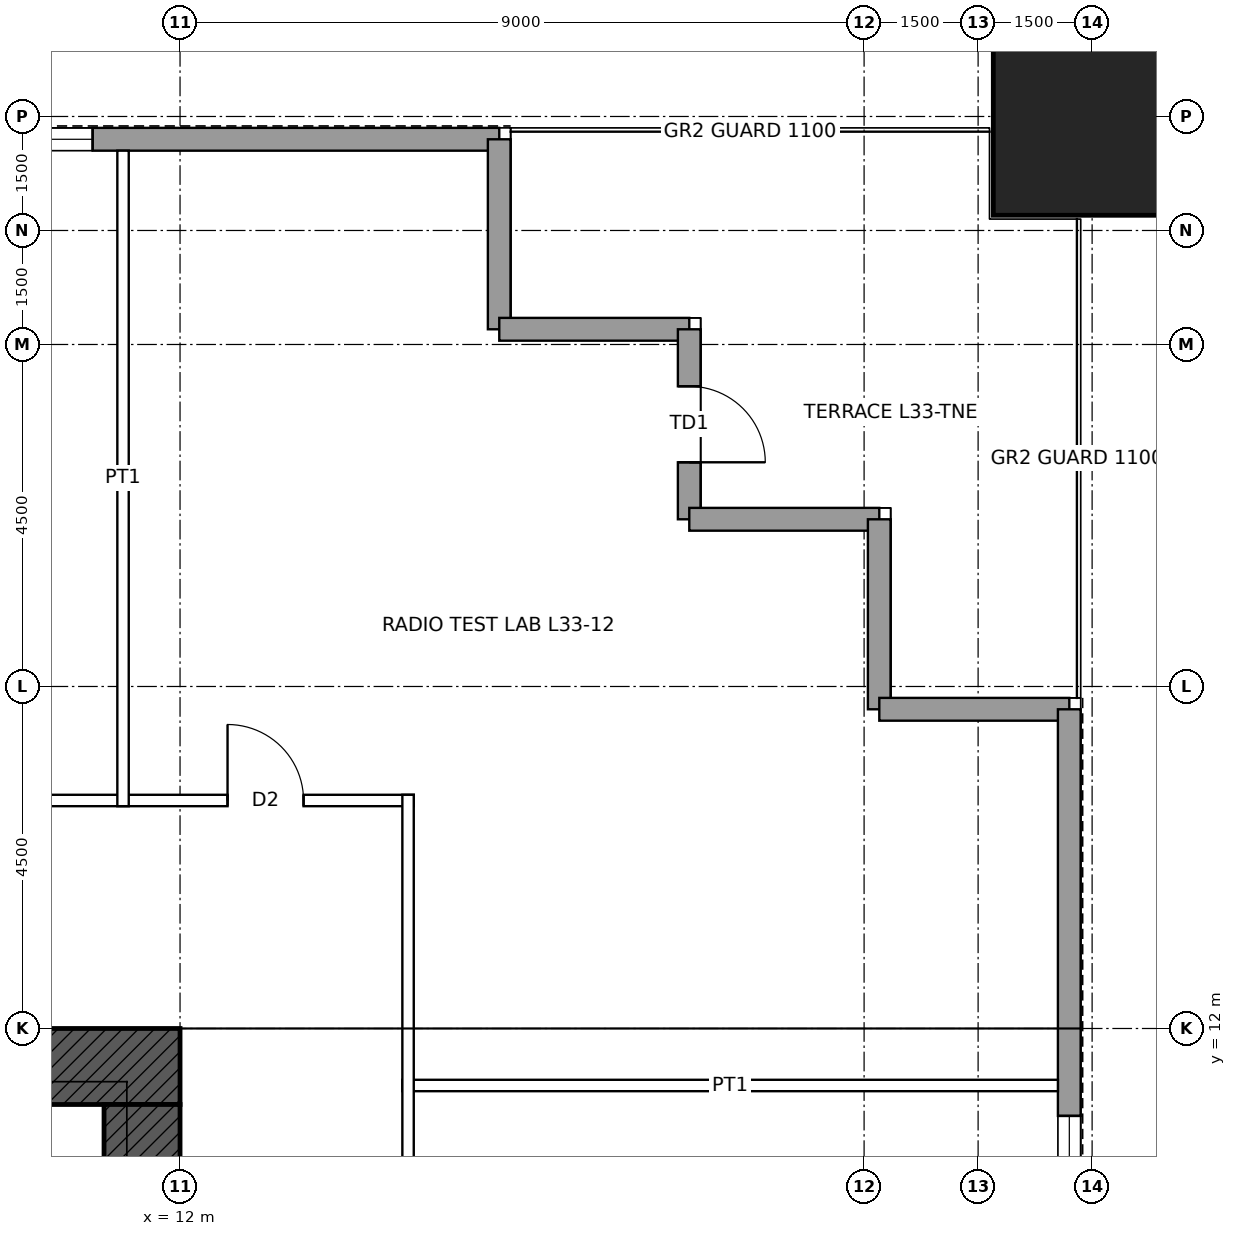
"""IFC4 building model, lengths in metres.
Left out: names, types, materials, properties, quantities, classifications, styles, units other than length and angle.
Written with IfcOpenShell. Run it as: python <this file> out.ifc"""

import sys

from ifc_helpers import new_model, si_unit, direction, frame, frame_2d, origin, origin_2d, place, context, subcontext, project, spatial, rectangle, hollow_rectangle, extrude, element, fill, save


model = new_model("IFC4")
c1 = context("Model", 3, precision=1e-05, world=origin(), true_north=direction((0.0, 1.0)))
c2 = subcontext(c1, "Body", "Model", "MODEL_VIEW")
j1 = project(units=[si_unit("LENGTHUNIT", "METRE"), si_unit("PLANEANGLEUNIT", "RADIAN")], contexts=[c1])
p1 = place(None, origin())
s1 = spatial("IfcSite", under=j1, at=p1, CompositionType="ELEMENT")
p2 = place(p1, origin())
s2 = spatial("IfcBuilding", under=s1, at=p2, CompositionType="ELEMENT")
p3 = place(p2, frame((0.0, 0.0, 162.9)))
s3 = spatial("IfcBuildingStorey", under=s2, at=p3, CompositionType="ELEMENT", Elevation=162.9)
p4 = place(p3, frame((24.0, 24.0, 0.0), z_axis=(0.0, 0.0, 1.0), x_axis=(1.0, 0.0, 0.0)))
e1 = element("IfcColumn", 1, at=p4, inside=s3, PredefinedType="COLUMN", context=c2, shape_type="SweptSolid", body=[
    extrude(hollow_rectangle(XDim=2.6, YDim=2.6, WallThickness=0.13, at=origin_2d()), origin(), (0.0, 0.0, 1.0), 4.5),
])
p5 = place(p3, frame((-12.0, 11.5, 0.0), z_axis=(0.0, 0.0, 1.0), x_axis=(1.0, 0.0, 0.0)))
e2 = element("IfcWall", 2, at=p5, inside=s3, PredefinedType="SHEAR", context=c2, shape_type="SweptSolid", body=[
    extrude(rectangle(XDim=24.0, YDim=1.0, at=frame_2d((12.0, 0.0))), origin(), (0.0, 0.0, 1.0), 4.5),
])
p6 = place(p5, frame((6.25, 0.0, 0.0)))
e3 = element("IfcOpeningElement", 3, at=p6, cuts=e2, PredefinedType="OPENING", context=c2, shape_type="SweptSolid", body=[
    extrude(rectangle(XDim=1.0, YDim=2.4, at=frame_2d((0.5, 1.2))), frame((0.0, 0.51, 0.0), z_axis=(0.0, -1.0, 0.0), x_axis=(1.0, 0.0, 0.0)), (0.0, 0.0, 1.0), 1.02),
])
p7 = place(p5, frame((16.75, 0.0, 0.0)))
e4 = element("IfcOpeningElement", 4, at=p7, cuts=e2, PredefinedType="OPENING", context=c2, shape_type="SweptSolid", body=[
    extrude(rectangle(XDim=1.0, YDim=2.4, at=frame_2d((0.5, 1.2))), frame((0.0, 0.51, 0.0), z_axis=(0.0, -1.0, 0.0), x_axis=(1.0, 0.0, 0.0)), (0.0, 0.0, 1.0), 1.02),
])
p8 = place(p3, frame((11.5, 11.0, 0.0), z_axis=(0.0, 0.0, 1.0), x_axis=(0.0, -1.0, 0.0)))
e5 = element("IfcWall", 5, at=p8, inside=s3, PredefinedType="SHEAR", context=c2, shape_type="SweptSolid", body=[
    extrude(rectangle(XDim=22.0, YDim=1.0, at=frame_2d((11.0, 0.0))), origin(), (0.0, 0.0, 1.0), 4.5),
])
p9 = place(p8, frame((10.5, 0.0, 0.0)))
e6 = element("IfcOpeningElement", 6, at=p9, cuts=e5, PredefinedType="OPENING", context=c2, shape_type="SweptSolid", body=[
    extrude(rectangle(XDim=1.0, YDim=2.4, at=frame_2d((0.5, 1.2))), frame((0.0, 0.51, 0.0), z_axis=(0.0, -1.0, 0.0), x_axis=(1.0, 0.0, 0.0)), (0.0, 0.0, 1.0), 1.02),
])
p10 = place(p3, frame((-16.2, 23.7, 0.0), z_axis=(0.0, 0.0, 1.0), x_axis=(1.0, 0.0, 0.0)))
e7 = element("IfcWall", 7, at=p10, inside=s3, PredefinedType="SOLIDWALL", context=c2, shape_type="SweptSolid", body=[
    extrude(rectangle(XDim=32.4, YDim=0.3, at=frame_2d((16.2, 0.0))), origin(), (0.0, 0.0, 1.0), 4.3),
])
p11 = place(p10, frame((5.35, 0.0, 1.0)))
e8 = element("IfcOpeningElement", 8, at=p11, cuts=e7, PredefinedType="OPENING", context=c2, shape_type="SweptSolid", body=[
    extrude(rectangle(XDim=1.8, YDim=1.2, at=frame_2d((0.9, 0.6))), frame((0.0, 0.16, 0.0), z_axis=(0.0, -1.0, 0.0), x_axis=(1.0, 0.0, 0.0)), (0.0, 0.0, 1.0), 0.32),
])
p12 = place(p10, frame((7.45, 0.0, 1.0)))
e9 = element("IfcOpeningElement", 9, at=p12, cuts=e7, PredefinedType="OPENING", context=c2, shape_type="SweptSolid", body=[
    extrude(rectangle(XDim=2.4, YDim=1.2, at=frame_2d((1.2, 0.6))), frame((0.0, 0.16, 0.0), z_axis=(0.0, -1.0, 0.0), x_axis=(1.0, 0.0, 0.0)), (0.0, 0.0, 1.0), 0.32),
])
p13 = place(p10, frame((10.15, 0.0, 1.0)))
e10 = element("IfcOpeningElement", 10, at=p13, cuts=e7, PredefinedType="OPENING", context=c2, shape_type="SweptSolid", body=[
    extrude(rectangle(XDim=2.4, YDim=1.2, at=frame_2d((1.2, 0.6))), frame((0.0, 0.16, 0.0), z_axis=(0.0, -1.0, 0.0), x_axis=(1.0, 0.0, 0.0)), (0.0, 0.0, 1.0), 0.32),
])
p14 = place(p10, frame((13.0, 0.0, 1.0)))
e11 = element("IfcOpeningElement", 11, at=p14, cuts=e7, PredefinedType="OPENING", context=c2, shape_type="SweptSolid", body=[
    extrude(rectangle(XDim=2.4, YDim=1.2, at=frame_2d((1.2, 0.6))), frame((0.0, 0.16, 0.0), z_axis=(0.0, -1.0, 0.0), x_axis=(1.0, 0.0, 0.0)), (0.0, 0.0, 1.0), 0.32),
])
p15 = place(p10, frame((17.0, 0.0, 1.0)))
e12 = element("IfcOpeningElement", 12, at=p15, cuts=e7, PredefinedType="OPENING", context=c2, shape_type="SweptSolid", body=[
    extrude(rectangle(XDim=2.4, YDim=1.2, at=frame_2d((1.2, 0.6))), frame((0.0, 0.16, 0.0), z_axis=(0.0, -1.0, 0.0), x_axis=(1.0, 0.0, 0.0)), (0.0, 0.0, 1.0), 0.32),
])
p16 = place(p10, frame((19.85, 0.0, 1.0)))
e13 = element("IfcOpeningElement", 13, at=p16, cuts=e7, PredefinedType="OPENING", context=c2, shape_type="SweptSolid", body=[
    extrude(rectangle(XDim=2.4, YDim=1.2, at=frame_2d((1.2, 0.6))), frame((0.0, 0.16, 0.0), z_axis=(0.0, -1.0, 0.0), x_axis=(1.0, 0.0, 0.0)), (0.0, 0.0, 1.0), 0.32),
])
p17 = place(p10, frame((22.55, 0.0, 1.0)))
e14 = element("IfcOpeningElement", 14, at=p17, cuts=e7, PredefinedType="OPENING", context=c2, shape_type="SweptSolid", body=[
    extrude(rectangle(XDim=2.4, YDim=1.2, at=frame_2d((1.2, 0.6))), frame((0.0, 0.16, 0.0), z_axis=(0.0, -1.0, 0.0), x_axis=(1.0, 0.0, 0.0)), (0.0, 0.0, 1.0), 0.32),
])
p18 = place(p10, frame((25.25, 0.0, 1.0)))
e15 = element("IfcOpeningElement", 15, at=p18, cuts=e7, PredefinedType="OPENING", context=c2, shape_type="SweptSolid", body=[
    extrude(rectangle(XDim=1.8, YDim=1.2, at=frame_2d((0.9, 0.6))), frame((0.0, 0.16, 0.0), z_axis=(0.0, -1.0, 0.0), x_axis=(1.0, 0.0, 0.0)), (0.0, 0.0, 1.0), 0.32),
])
for number, where, z_axis, x_axis in (
    (16, (16.2, 23.7, 0.0), (0.0, 0.0, 1.0), (0.0, -1.0, 0.0)),
    (17, (16.2, 21.2, 0.0), (0.0, 0.0, 1.0), (1.0, 0.0, 0.0)),
):
    element("IfcWall", number, at=place(p3, frame(where, z_axis=z_axis, x_axis=x_axis)), inside=s3, PredefinedType="SOLIDWALL", context=c2, shape_type="SweptSolid", body=[
        extrude(rectangle(XDim=2.5, YDim=0.3, at=frame_2d((1.25, 0.0))), origin(), (0.0, 0.0, 1.0), 4.3),
    ])
p19 = place(p3, frame((18.7, 21.2, 0.0), z_axis=(0.0, 0.0, 1.0), x_axis=(0.0, -1.0, 0.0)))
e18 = element("IfcWall", 18, at=p19, inside=s3, PredefinedType="SOLIDWALL", context=c2, shape_type="SweptSolid", body=[
    extrude(rectangle(XDim=2.5, YDim=0.3, at=frame_2d((1.25, 0.0))), origin(), (0.0, 0.0, 1.0), 4.3),
])
p20 = place(p19, frame((0.75, 0.0, 0.0)))
e19 = element("IfcOpeningElement", 19, at=p20, cuts=e18, PredefinedType="OPENING", context=c2, shape_type="SweptSolid", body=[
    extrude(rectangle(XDim=1.0, YDim=2.4, at=frame_2d((0.5, 1.2))), frame((0.0, 0.16, 0.0), z_axis=(0.0, -1.0, 0.0), x_axis=(1.0, 0.0, 0.0)), (0.0, 0.0, 1.0), 0.32),
])
for number, where, z_axis, x_axis in (
    (20, (18.7, 18.7, 0.0), (0.0, 0.0, 1.0), (1.0, 0.0, 0.0)),
    (21, (21.2, 18.7, 0.0), (0.0, 0.0, 1.0), (0.0, -1.0, 0.0)),
    (22, (21.2, 16.2, 0.0), (0.0, 0.0, 1.0), (1.0, 0.0, 0.0)),
):
    element("IfcWall", number, at=place(p3, frame(where, z_axis=z_axis, x_axis=x_axis)), inside=s3, PredefinedType="SOLIDWALL", context=c2, shape_type="SweptSolid", body=[
        extrude(rectangle(XDim=2.5, YDim=0.3, at=frame_2d((1.25, 0.0))), origin(), (0.0, 0.0, 1.0), 4.3),
    ])
p21 = place(p3, frame((23.7, 16.2, 0.0), z_axis=(0.0, 0.0, 1.0), x_axis=(0.0, -1.0, 0.0)))
e23 = element("IfcWall", 23, at=p21, inside=s3, PredefinedType="SOLIDWALL", context=c2, shape_type="SweptSolid", body=[
    extrude(rectangle(XDim=32.4, YDim=0.3, at=frame_2d((16.2, 0.0))), origin(), (0.0, 0.0, 1.0), 4.3),
])
p22 = place(p21, frame((5.35, 0.0, 1.0)))
e24 = element("IfcOpeningElement", 24, at=p22, cuts=e23, PredefinedType="OPENING", context=c2, shape_type="SweptSolid", body=[
    extrude(rectangle(XDim=1.8, YDim=1.2, at=frame_2d((0.9, 0.6))), frame((0.0, 0.16, 0.0), z_axis=(0.0, -1.0, 0.0), x_axis=(1.0, 0.0, 0.0)), (0.0, 0.0, 1.0), 0.32),
])
p23 = place(p21, frame((7.45, 0.0, 1.0)))
e25 = element("IfcOpeningElement", 25, at=p23, cuts=e23, PredefinedType="OPENING", context=c2, shape_type="SweptSolid", body=[
    extrude(rectangle(XDim=2.4, YDim=1.2, at=frame_2d((1.2, 0.6))), frame((0.0, 0.16, 0.0), z_axis=(0.0, -1.0, 0.0), x_axis=(1.0, 0.0, 0.0)), (0.0, 0.0, 1.0), 0.32),
])
p24 = place(p21, frame((10.15, 0.0, 1.0)))
e26 = element("IfcOpeningElement", 26, at=p24, cuts=e23, PredefinedType="OPENING", context=c2, shape_type="SweptSolid", body=[
    extrude(rectangle(XDim=2.4, YDim=1.2, at=frame_2d((1.2, 0.6))), frame((0.0, 0.16, 0.0), z_axis=(0.0, -1.0, 0.0), x_axis=(1.0, 0.0, 0.0)), (0.0, 0.0, 1.0), 0.32),
])
p25 = place(p21, frame((13.0, 0.0, 1.0)))
e27 = element("IfcOpeningElement", 27, at=p25, cuts=e23, PredefinedType="OPENING", context=c2, shape_type="SweptSolid", body=[
    extrude(rectangle(XDim=2.4, YDim=1.2, at=frame_2d((1.2, 0.6))), frame((0.0, 0.16, 0.0), z_axis=(0.0, -1.0, 0.0), x_axis=(1.0, 0.0, 0.0)), (0.0, 0.0, 1.0), 0.32),
])
p26 = place(p21, frame((17.0, 0.0, 1.0)))
e28 = element("IfcOpeningElement", 28, at=p26, cuts=e23, PredefinedType="OPENING", context=c2, shape_type="SweptSolid", body=[
    extrude(rectangle(XDim=2.4, YDim=1.2, at=frame_2d((1.2, 0.6))), frame((0.0, 0.16, 0.0), z_axis=(0.0, -1.0, 0.0), x_axis=(1.0, 0.0, 0.0)), (0.0, 0.0, 1.0), 0.32),
])
p27 = place(p21, frame((20.45, 0.0, 1.0)))
e29 = element("IfcOpeningElement", 29, at=p27, cuts=e23, PredefinedType="OPENING", context=c2, shape_type="SweptSolid", body=[
    extrude(rectangle(XDim=2.4, YDim=1.2, at=frame_2d((1.2, 0.6))), frame((0.0, 0.16, 0.0), z_axis=(0.0, -1.0, 0.0), x_axis=(1.0, 0.0, 0.0)), (0.0, 0.0, 1.0), 0.32),
])
p28 = place(p21, frame((23.15, 0.0, 1.0)))
e30 = element("IfcOpeningElement", 30, at=p28, cuts=e23, PredefinedType="OPENING", context=c2, shape_type="SweptSolid", body=[
    extrude(rectangle(XDim=1.8, YDim=1.2, at=frame_2d((0.9, 0.6))), frame((0.0, 0.16, 0.0), z_axis=(0.0, -1.0, 0.0), x_axis=(1.0, 0.0, 0.0)), (0.0, 0.0, 1.0), 0.32),
])
p29 = place(p21, frame((25.25, 0.0, 1.0)))
e31 = element("IfcOpeningElement", 31, at=p29, cuts=e23, PredefinedType="OPENING", context=c2, shape_type="SweptSolid", body=[
    extrude(rectangle(XDim=1.8, YDim=1.2, at=frame_2d((0.9, 0.6))), frame((0.0, 0.16, 0.0), z_axis=(0.0, -1.0, 0.0), x_axis=(1.0, 0.0, 0.0)), (0.0, 0.0, 1.0), 0.32),
])
p30 = place(p3, frame((14.925, 11.25, 0.0), z_axis=(0.0, 0.0, 1.0), x_axis=(1.0, 0.0, 0.0)))
e32 = element("IfcWall", 32, at=p30, inside=s3, PredefinedType="PARTITIONING", context=c2, shape_type="SweptSolid", body=[
    extrude(rectangle(XDim=8.625, YDim=0.15, at=frame_2d((4.312, 0.0))), origin(), (0.0, 0.0, 1.0), 3.431),
])
p31 = place(p3, frame((-15.075, 15.0, 0.0), z_axis=(0.0, 0.0, 1.0), x_axis=(1.0, 0.0, 0.0)))
e33 = element("IfcWall", 33, at=p31, inside=s3, PredefinedType="PARTITIONING", context=c2, shape_type="SweptSolid", body=[
    extrude(rectangle(XDim=30.15, YDim=0.15, at=frame_2d((15.075, 0.0))), origin(), (0.0, 0.0, 1.0), 4.3),
])
p32 = place(p31, frame((8.55, 0.0, 0.0)))
e34 = element("IfcOpeningElement", 34, at=p32, cuts=e33, PredefinedType="OPENING", context=c2, shape_type="SweptSolid", body=[
    extrude(rectangle(XDim=1.8, YDim=2.4, at=frame_2d((0.9, 1.2))), frame((0.0, 0.085, 0.0), z_axis=(0.0, -1.0, 0.0), x_axis=(1.0, 0.0, 0.0)), (0.0, 0.0, 1.0), 0.17),
])
p33 = place(p31, frame((19.8, 0.0, 0.0)))
e35 = element("IfcOpeningElement", 35, at=p33, cuts=e33, PredefinedType="OPENING", context=c2, shape_type="SweptSolid", body=[
    extrude(rectangle(XDim=1.8, YDim=2.4, at=frame_2d((0.9, 1.2))), frame((0.0, 0.085, 0.0), z_axis=(0.0, -1.0, 0.0), x_axis=(1.0, 0.0, 0.0)), (0.0, 0.0, 1.0), 0.17),
])
p34 = place(p31, frame((27.7, 0.0, 0.0)))
e36 = element("IfcOpeningElement", 36, at=p34, cuts=e33, PredefinedType="OPENING", context=c2, shape_type="SweptSolid", body=[
    extrude(rectangle(XDim=1.0, YDim=2.1, at=frame_2d((0.5, 1.05))), frame((0.0, 0.085, 0.0), z_axis=(0.0, -1.0, 0.0), x_axis=(1.0, 0.0, 0.0)), (0.0, 0.0, 1.0), 0.17),
])
p35 = place(p31, frame((1.45, 0.0, 0.0)))
e37 = element("IfcOpeningElement", 37, at=p35, cuts=e33, PredefinedType="OPENING", context=c2, shape_type="SweptSolid", body=[
    extrude(rectangle(XDim=1.0, YDim=2.1, at=frame_2d((0.5, 1.05))), frame((0.0, 0.085, 0.0), z_axis=(0.0, -1.0, 0.0), x_axis=(1.0, 0.0, 0.0)), (0.0, 0.0, 1.0), 0.17),
])
p36 = place(p3, frame((11.25, 14.925, 0.0), z_axis=(0.0, 0.0, 1.0), x_axis=(0.0, 1.0, 0.0)))
e38 = element("IfcWall", 38, at=p36, inside=s3, PredefinedType="PARTITIONING", context=c2, shape_type="SweptSolid", body=[
    extrude(rectangle(XDim=8.625, YDim=0.15, at=frame_2d((4.312, 0.0))), origin(), (0.0, 0.0, 1.0), 3.431),
])
p37 = place(p3, frame((15.0, -15.075, 0.0), z_axis=(0.0, 0.0, 1.0), x_axis=(0.0, 1.0, 0.0)))
e39 = element("IfcWall", 39, at=p37, inside=s3, PredefinedType="PARTITIONING", context=c2, shape_type="SweptSolid", body=[
    extrude(rectangle(XDim=30.15, YDim=0.15, at=frame_2d((15.075, 0.0))), origin(), (0.0, 0.0, 1.0), 4.3),
])
p38 = place(p37, frame((17.925, 0.0, 0.0)))
e40 = element("IfcOpeningElement", 40, at=p38, cuts=e39, PredefinedType="OPENING", context=c2, shape_type="SweptSolid", body=[
    extrude(rectangle(XDim=1.8, YDim=2.4, at=frame_2d((0.9, 1.2))), frame((0.0, 0.085, 0.0), z_axis=(0.0, -1.0, 0.0), x_axis=(1.0, 0.0, 0.0)), (0.0, 0.0, 1.0), 0.17),
])
p39 = place(p37, frame((6.675, 0.0, 0.0)))
e41 = element("IfcOpeningElement", 41, at=p39, cuts=e39, PredefinedType="OPENING", context=c2, shape_type="SweptSolid", body=[
    extrude(rectangle(XDim=1.8, YDim=2.4, at=frame_2d((0.9, 1.2))), frame((0.0, 0.085, 0.0), z_axis=(0.0, -1.0, 0.0), x_axis=(1.0, 0.0, 0.0)), (0.0, 0.0, 1.0), 0.17),
])
p40 = place(p18, origin())
e42 = element("IfcWindow", 42, at=p40, inside=s3, PartitioningType="SINGLE_PANEL", PredefinedType="WINDOW", context=c2, shape_type="SweptSolid", body=[
    extrude(rectangle(XDim=1.8, YDim=1.2, at=frame_2d((0.9, 0.6))), frame((0.0, 0.03, 0.0), z_axis=(0.0, -1.0, 0.0), x_axis=(1.0, 0.0, 0.0)), (0.0, 0.0, 1.0), 0.06),
])
fill(e15, e42)
p41 = place(p20, origin())
e43 = element("IfcDoor", 43, at=p41, inside=s3, OperationType="SINGLE_SWING_RIGHT", PredefinedType="DOOR", context=c2, shape_type="SweptSolid", body=[
    extrude(rectangle(XDim=1.0, YDim=2.4, at=frame_2d((0.5, 1.2))), frame((0.0, 0.025, 0.0), z_axis=(0.0, -1.0, 0.0), x_axis=(1.0, 0.0, 0.0)), (0.0, 0.0, 1.0), 0.05),
])
fill(e19, e43)
p42 = place(p22, origin())
e44 = element("IfcWindow", 44, at=p42, inside=s3, PartitioningType="SINGLE_PANEL", PredefinedType="WINDOW", context=c2, shape_type="SweptSolid", body=[
    extrude(rectangle(XDim=1.8, YDim=1.2, at=frame_2d((0.9, 0.6))), frame((0.0, 0.03, 0.0), z_axis=(0.0, -1.0, 0.0), x_axis=(1.0, 0.0, 0.0)), (0.0, 0.0, 1.0), 0.06),
])
fill(e24, e44)
p43 = place(p34, origin())
e45 = element("IfcDoor", 45, at=p43, inside=s3, OperationType="SINGLE_SWING_LEFT", PredefinedType="DOOR", context=c2, shape_type="SweptSolid", body=[
    extrude(rectangle(XDim=1.0, YDim=2.1, at=frame_2d((0.5, 1.05))), frame((0.0, 0.025, 0.0), z_axis=(0.0, -1.0, 0.0), x_axis=(1.0, 0.0, 0.0)), (0.0, 0.0, 1.0), 0.05),
])
fill(e36, e45)
save(model, sys.argv[1])
